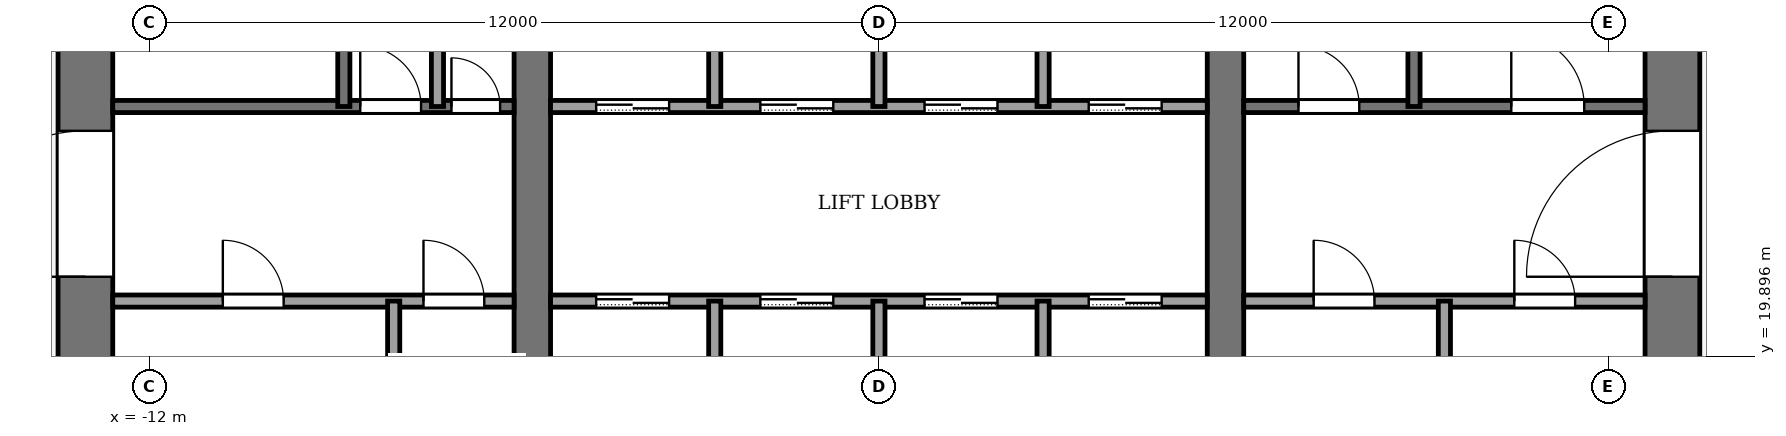
"""IFC4 building model, lengths in metres.
Left out: names, types, materials, properties, quantities, classifications, styles, units other than length and angle.
Written with IfcOpenShell. Run it as: python <this file> out.ifc"""

import sys

from ifc_helpers import new_model, si_unit, direction, frame, frame_2d, origin, place, context, subcontext, project, spatial, rectangle, extrude, element, fill, save


model = new_model("IFC4")
c1 = context("Model", 3, precision=1e-05, world=origin(), true_north=direction((0.0, 1.0)))
c2 = subcontext(c1, "Body", "Model", "MODEL_VIEW")
j1 = project(units=[si_unit("LENGTHUNIT", "METRE"), si_unit("PLANEANGLEUNIT", "RADIAN")], contexts=[c1])
p1 = place(None, origin())
s1 = spatial("IfcSite", under=j1, at=p1, CompositionType="ELEMENT")
p2 = place(p1, origin())
s2 = spatial("IfcBuilding", under=s1, at=p2, CompositionType="ELEMENT")
p3 = place(p2, frame((0.0, 0.0, 186.0)))
s3 = spatial("IfcBuildingStorey", under=s2, at=p3, CompositionType="ELEMENT", Elevation=186.0)
p4 = place(p3, frame((-13.05, 18.4, -0.13), z_axis=(0.0, 0.0, 1.0), x_axis=(0.0, 1.0, 0.0)))
e1 = element("IfcWall", 1, at=p4, inside=s3, PredefinedType="SHEAR", context=c2, shape_type="SweptSolid", body=[
    extrude(rectangle(XDim=19.2, YDim=0.9, at=frame_2d((9.6, 0.0))), origin(), (0.0, 0.0, 1.0), 4.0),
])
p5 = place(p4, frame((2.8, 0.0, 0.13)))
e2 = element("IfcOpeningElement", 2, at=p5, cuts=e1, PredefinedType="OPENING", context=c2, shape_type="SweptSolid", body=[
    extrude(rectangle(XDim=2.4, YDim=2.4, at=frame_2d((1.2, 1.2))), frame((0.0, 0.46, 0.0), z_axis=(0.0, -1.0, 0.0), x_axis=(1.0, 0.0, 0.0)), (0.0, 0.0, 1.0), 0.92),
])
p6 = place(p4, frame((13.4, 0.0, 0.13)))
e3 = element("IfcOpeningElement", 3, at=p6, cuts=e1, PredefinedType="OPENING", context=c2, shape_type="SweptSolid", body=[
    extrude(rectangle(XDim=1.4, YDim=2.2, at=frame_2d((0.7, 1.1))), frame((0.0, 0.46, 0.0), z_axis=(0.0, -1.0, 0.0), x_axis=(1.0, 0.0, 0.0)), (0.0, 0.0, 1.0), 0.92),
])
p7 = place(p3, frame((13.05, 18.4, -0.13), z_axis=(0.0, 0.0, 1.0), x_axis=(0.0, 1.0, 0.0)))
e4 = element("IfcWall", 4, at=p7, inside=s3, PredefinedType="SHEAR", context=c2, shape_type="SweptSolid", body=[
    extrude(rectangle(XDim=19.2, YDim=0.9, at=frame_2d((9.6, 0.0))), origin(), (0.0, 0.0, 1.0), 4.0),
])
p8 = place(p7, frame((2.8, 0.0, 0.13)))
e5 = element("IfcOpeningElement", 5, at=p8, cuts=e4, PredefinedType="OPENING", context=c2, shape_type="SweptSolid", body=[
    extrude(rectangle(XDim=2.4, YDim=2.4, at=frame_2d((1.2, 1.2))), frame((0.0, 0.46, 0.0), z_axis=(0.0, -1.0, 0.0), x_axis=(1.0, 0.0, 0.0)), (0.0, 0.0, 1.0), 0.92),
])
p9 = place(p7, frame((13.3, 0.0, 0.13)))
e6 = element("IfcOpeningElement", 6, at=p9, cuts=e4, PredefinedType="OPENING", context=c2, shape_type="SweptSolid", body=[
    extrude(rectangle(XDim=2.4, YDim=2.4, at=frame_2d((1.2, 1.2))), frame((0.0, 0.46, 0.0), z_axis=(0.0, -1.0, 0.0), x_axis=(1.0, 0.0, 0.0)), (0.0, 0.0, 1.0), 0.92),
])
p10 = place(p3, frame((-5.7, 18.4, -0.13), z_axis=(0.0, 0.0, 1.0), x_axis=(0.0, 1.0, 0.0)))
e7 = element("IfcWall", 7, at=p10, inside=s3, PredefinedType="SHEAR", context=c2, shape_type="SweptSolid", body=[
    extrude(rectangle(XDim=19.2, YDim=0.6, at=frame_2d((9.6, 0.0))), origin(), (0.0, 0.0, 1.0), 4.0),
])
p11 = place(p10, frame((8.35, 0.0, 0.13)))
e8 = element("IfcOpeningElement", 8, at=p11, cuts=e7, PredefinedType="OPENING", context=c2, shape_type="SweptSolid", body=[
    extrude(rectangle(XDim=0.9, YDim=2.1, at=frame_2d((0.45, 1.05))), frame((0.0, 0.31, 0.0), z_axis=(0.0, -1.0, 0.0), x_axis=(1.0, 0.0, 0.0)), (0.0, 0.0, 1.0), 0.62),
])
p12 = place(p3, frame((5.7, 18.4, -0.13), z_axis=(0.0, 0.0, 1.0), x_axis=(0.0, 1.0, 0.0)))
e9 = element("IfcWall", 9, at=p12, inside=s3, PredefinedType="SHEAR", context=c2, shape_type="SweptSolid", body=[
    extrude(rectangle(XDim=19.2, YDim=0.6, at=frame_2d((9.6, 0.0))), origin(), (0.0, 0.0, 1.0), 4.0),
])
p13 = place(p12, frame((8.35, 0.0, 0.13)))
e10 = element("IfcOpeningElement", 10, at=p13, cuts=e9, PredefinedType="OPENING", context=c2, shape_type="SweptSolid", body=[
    extrude(rectangle(XDim=0.9, YDim=2.1, at=frame_2d((0.45, 1.05))), frame((0.0, 0.31, 0.0), z_axis=(0.0, -1.0, 0.0), x_axis=(1.0, 0.0, 0.0)), (0.0, 0.0, 1.0), 0.62),
])
p14 = place(p12, frame((13.3, 0.0, 0.13)))
e11 = element("IfcOpeningElement", 11, at=p14, cuts=e9, PredefinedType="OPENING", context=c2, shape_type="SweptSolid", body=[
    extrude(rectangle(XDim=2.4, YDim=2.4, at=frame_2d((1.2, 1.2))), frame((0.0, 0.31, 0.0), z_axis=(0.0, -1.0, 0.0), x_axis=(1.0, 0.0, 0.0)), (0.0, 0.0, 1.0), 0.62),
])
p15 = place(p3, frame((-12.6, 20.8, 0.0), z_axis=(0.0, 0.0, 1.0), x_axis=(1.0, 0.0, 0.0)))
e12 = element("IfcWall", 12, at=p15, inside=s3, PredefinedType="PARTITIONING", context=c2, shape_type="SweptSolid", body=[
    extrude(rectangle(XDim=6.6, YDim=0.2, at=frame_2d((3.3, 0.0))), origin(), (0.0, 0.0, 1.0), 3.87),
])
p16 = place(p15, frame((1.81, 0.0, 0.0)))
e13 = element("IfcOpeningElement", 13, at=p16, cuts=e12, PredefinedType="OPENING", context=c2, shape_type="SweptSolid", body=[
    extrude(rectangle(XDim=1.0, YDim=2.1, at=frame_2d((0.5, 1.05))), frame((0.0, 0.11, 0.0), z_axis=(0.0, -1.0, 0.0), x_axis=(1.0, 0.0, 0.0)), (0.0, 0.0, 1.0), 0.22),
])
p17 = place(p15, frame((5.11, 0.0, 0.0)))
e14 = element("IfcOpeningElement", 14, at=p17, cuts=e12, PredefinedType="OPENING", context=c2, shape_type="SweptSolid", body=[
    extrude(rectangle(XDim=1.0, YDim=2.1, at=frame_2d((0.5, 1.05))), frame((0.0, 0.11, 0.0), z_axis=(0.0, -1.0, 0.0), x_axis=(1.0, 0.0, 0.0)), (0.0, 0.0, 1.0), 0.22),
])
p18 = place(p3, frame((-5.4, 20.8, 0.0), z_axis=(0.0, 0.0, 1.0), x_axis=(1.0, 0.0, 0.0)))
e15 = element("IfcWall", 15, at=p18, inside=s3, PredefinedType="PARTITIONING", context=c2, shape_type="SweptSolid", body=[
    extrude(rectangle(XDim=10.8, YDim=0.2, at=frame_2d((5.4, 0.0))), origin(), (0.0, 0.0, 1.0), 3.87),
])
p19 = place(p18, frame((0.75, 0.0, 0.0)))
e16 = element("IfcOpeningElement", 16, at=p19, cuts=e15, PredefinedType="OPENING", context=c2, shape_type="SweptSolid", body=[
    extrude(rectangle(XDim=1.2, YDim=2.2, at=frame_2d((0.6, 1.1))), frame((0.0, 0.11, 0.0), z_axis=(0.0, -1.0, 0.0), x_axis=(1.0, 0.0, 0.0)), (0.0, 0.0, 1.0), 0.22),
])
p20 = place(p18, frame((3.45, 0.0, 0.0)))
e17 = element("IfcOpeningElement", 17, at=p20, cuts=e15, PredefinedType="OPENING", context=c2, shape_type="SweptSolid", body=[
    extrude(rectangle(XDim=1.2, YDim=2.2, at=frame_2d((0.6, 1.1))), frame((0.0, 0.11, 0.0), z_axis=(0.0, -1.0, 0.0), x_axis=(1.0, 0.0, 0.0)), (0.0, 0.0, 1.0), 0.22),
])
p21 = place(p18, frame((6.15, 0.0, 0.0)))
e18 = element("IfcOpeningElement", 18, at=p21, cuts=e15, PredefinedType="OPENING", context=c2, shape_type="SweptSolid", body=[
    extrude(rectangle(XDim=1.2, YDim=2.2, at=frame_2d((0.6, 1.1))), frame((0.0, 0.11, 0.0), z_axis=(0.0, -1.0, 0.0), x_axis=(1.0, 0.0, 0.0)), (0.0, 0.0, 1.0), 0.22),
])
p22 = place(p18, frame((8.85, 0.0, 0.0)))
e19 = element("IfcOpeningElement", 19, at=p22, cuts=e15, PredefinedType="OPENING", context=c2, shape_type="SweptSolid", body=[
    extrude(rectangle(XDim=1.2, YDim=2.2, at=frame_2d((0.6, 1.1))), frame((0.0, 0.11, 0.0), z_axis=(0.0, -1.0, 0.0), x_axis=(1.0, 0.0, 0.0)), (0.0, 0.0, 1.0), 0.22),
])
p23 = place(p3, frame((6.0, 20.8, 0.0), z_axis=(0.0, 0.0, 1.0), x_axis=(1.0, 0.0, 0.0)))
e20 = element("IfcWall", 20, at=p23, inside=s3, PredefinedType="PARTITIONING", context=c2, shape_type="SweptSolid", body=[
    extrude(rectangle(XDim=6.6, YDim=0.2, at=frame_2d((3.3, 0.0))), origin(), (0.0, 0.0, 1.0), 3.87),
])
p24 = place(p23, frame((1.15, 0.0, 0.0)))
e21 = element("IfcOpeningElement", 21, at=p24, cuts=e20, PredefinedType="OPENING", context=c2, shape_type="SweptSolid", body=[
    extrude(rectangle(XDim=1.0, YDim=2.1, at=frame_2d((0.5, 1.05))), frame((0.0, 0.11, 0.0), z_axis=(0.0, -1.0, 0.0), x_axis=(1.0, 0.0, 0.0)), (0.0, 0.0, 1.0), 0.22),
])
p25 = place(p23, frame((4.45, 0.0, 0.0)))
e22 = element("IfcOpeningElement", 22, at=p25, cuts=e20, PredefinedType="OPENING", context=c2, shape_type="SweptSolid", body=[
    extrude(rectangle(XDim=1.0, YDim=2.1, at=frame_2d((0.5, 1.05))), frame((0.0, 0.11, 0.0), z_axis=(0.0, -1.0, 0.0), x_axis=(1.0, 0.0, 0.0)), (0.0, 0.0, 1.0), 0.22),
])
p26 = place(p3, frame((-12.6, 24.0, 0.0), z_axis=(0.0, 0.0, 1.0), x_axis=(1.0, 0.0, 0.0)))
e23 = element("IfcWall", 23, at=p26, inside=s3, PredefinedType="PARTITIONING", context=c2, shape_type="SweptSolid", body=[
    extrude(rectangle(XDim=6.6, YDim=0.2, at=frame_2d((3.3, 0.0))), origin(), (0.0, 0.0, 1.0), 3.87),
])
p27 = place(p26, frame((4.07, 0.0, 0.0)))
e24 = element("IfcOpeningElement", 24, at=p27, cuts=e23, PredefinedType="OPENING", context=c2, shape_type="SweptSolid", body=[
    extrude(rectangle(XDim=1.0, YDim=2.1, at=frame_2d((0.5, 1.05))), frame((0.0, 0.11, 0.0), z_axis=(0.0, -1.0, 0.0), x_axis=(1.0, 0.0, 0.0)), (0.0, 0.0, 1.0), 0.22),
])
p28 = place(p26, frame((5.57, 0.0, 0.0)))
e25 = element("IfcOpeningElement", 25, at=p28, cuts=e23, PredefinedType="OPENING", context=c2, shape_type="SweptSolid", body=[
    extrude(rectangle(XDim=0.8, YDim=2.1, at=frame_2d((0.4, 1.05))), frame((0.0, 0.11, 0.0), z_axis=(0.0, -1.0, 0.0), x_axis=(1.0, 0.0, 0.0)), (0.0, 0.0, 1.0), 0.22),
])
p29 = place(p3, frame((-5.4, 24.0, 0.0), z_axis=(0.0, 0.0, 1.0), x_axis=(1.0, 0.0, 0.0)))
e26 = element("IfcWall", 26, at=p29, inside=s3, PredefinedType="PARTITIONING", context=c2, shape_type="SweptSolid", body=[
    extrude(rectangle(XDim=10.8, YDim=0.2, at=frame_2d((5.4, 0.0))), origin(), (0.0, 0.0, 1.0), 3.87),
])
p30 = place(p29, frame((0.75, 0.0, 0.0)))
e27 = element("IfcOpeningElement", 27, at=p30, cuts=e26, PredefinedType="OPENING", context=c2, shape_type="SweptSolid", body=[
    extrude(rectangle(XDim=1.2, YDim=2.2, at=frame_2d((0.6, 1.1))), frame((0.0, 0.11, 0.0), z_axis=(0.0, -1.0, 0.0), x_axis=(1.0, 0.0, 0.0)), (0.0, 0.0, 1.0), 0.22),
])
p31 = place(p29, frame((3.45, 0.0, 0.0)))
e28 = element("IfcOpeningElement", 28, at=p31, cuts=e26, PredefinedType="OPENING", context=c2, shape_type="SweptSolid", body=[
    extrude(rectangle(XDim=1.2, YDim=2.2, at=frame_2d((0.6, 1.1))), frame((0.0, 0.11, 0.0), z_axis=(0.0, -1.0, 0.0), x_axis=(1.0, 0.0, 0.0)), (0.0, 0.0, 1.0), 0.22),
])
p32 = place(p29, frame((6.15, 0.0, 0.0)))
e29 = element("IfcOpeningElement", 29, at=p32, cuts=e26, PredefinedType="OPENING", context=c2, shape_type="SweptSolid", body=[
    extrude(rectangle(XDim=1.2, YDim=2.2, at=frame_2d((0.6, 1.1))), frame((0.0, 0.11, 0.0), z_axis=(0.0, -1.0, 0.0), x_axis=(1.0, 0.0, 0.0)), (0.0, 0.0, 1.0), 0.22),
])
p33 = place(p29, frame((8.85, 0.0, 0.0)))
e30 = element("IfcOpeningElement", 30, at=p33, cuts=e26, PredefinedType="OPENING", context=c2, shape_type="SweptSolid", body=[
    extrude(rectangle(XDim=1.2, YDim=2.2, at=frame_2d((0.6, 1.1))), frame((0.0, 0.11, 0.0), z_axis=(0.0, -1.0, 0.0), x_axis=(1.0, 0.0, 0.0)), (0.0, 0.0, 1.0), 0.22),
])
p34 = place(p3, frame((6.0, 24.0, 0.0), z_axis=(0.0, 0.0, 1.0), x_axis=(1.0, 0.0, 0.0)))
e31 = element("IfcWall", 31, at=p34, inside=s3, PredefinedType="PARTITIONING", context=c2, shape_type="SweptSolid", body=[
    extrude(rectangle(XDim=6.6, YDim=0.2, at=frame_2d((3.3, 0.0))), origin(), (0.0, 0.0, 1.0), 3.87),
])
p35 = place(p34, frame((0.9, 0.0, 0.0)))
e32 = element("IfcOpeningElement", 32, at=p35, cuts=e31, PredefinedType="OPENING", context=c2, shape_type="SweptSolid", body=[
    extrude(rectangle(XDim=1.0, YDim=2.1, at=frame_2d((0.5, 1.05))), frame((0.0, 0.11, 0.0), z_axis=(0.0, -1.0, 0.0), x_axis=(1.0, 0.0, 0.0)), (0.0, 0.0, 1.0), 0.22),
])
p36 = place(p34, frame((4.4, 0.0, 0.0)))
e33 = element("IfcOpeningElement", 33, at=p36, cuts=e31, PredefinedType="OPENING", context=c2, shape_type="SweptSolid", body=[
    extrude(rectangle(XDim=1.2, YDim=2.2, at=frame_2d((0.6, 1.1))), frame((0.0, 0.11, 0.0), z_axis=(0.0, -1.0, 0.0), x_axis=(1.0, 0.0, 0.0)), (0.0, 0.0, 1.0), 0.22),
])
p37 = place(p3, frame((-8.8, 24.0, 0.0), z_axis=(0.0, 0.0, 1.0), x_axis=(0.0, 1.0, 0.0)))
e34 = element("IfcWall", 34, at=p37, inside=s3, PredefinedType="PARTITIONING", context=c2, shape_type="SweptSolid", body=[
    extrude(rectangle(XDim=7.4, YDim=0.2, at=frame_2d((3.7, 0.0))), origin(), (0.0, 0.0, 1.0), 3.87),
])
p38 = place(p3, frame((-7.98, 18.4, 0.0), z_axis=(0.0, 0.0, 1.0), x_axis=(0.0, 1.0, 0.0)))
e35 = element("IfcWall", 35, at=p38, inside=s3, PredefinedType="PARTITIONING", context=c2, shape_type="SweptSolid", body=[
    extrude(rectangle(XDim=2.4, YDim=0.2, at=frame_2d((1.2, 0.0))), origin(), (0.0, 0.0, 1.0), 3.87),
])
p39 = place(p3, frame((-7.26, 24.0, 0.0), z_axis=(0.0, 0.0, 1.0), x_axis=(0.0, 1.0, 0.0)))
e36 = element("IfcWall", 36, at=p39, inside=s3, PredefinedType="PARTITIONING", context=c2, shape_type="SweptSolid", body=[
    extrude(rectangle(XDim=7.4, YDim=0.2, at=frame_2d((3.7, 0.0))), origin(), (0.0, 0.0, 1.0), 3.87),
])
p40 = place(p3, frame((-2.7, 18.4, 0.0), z_axis=(0.0, 0.0, 1.0), x_axis=(0.0, 1.0, 0.0)))
e37 = element("IfcWall", 37, at=p40, inside=s3, PredefinedType="PARTITIONING", context=c2, shape_type="SweptSolid", body=[
    extrude(rectangle(XDim=2.4, YDim=0.2, at=frame_2d((1.2, 0.0))), origin(), (0.0, 0.0, 1.0), 3.87),
])
p41 = place(p3, frame((-2.7, 24.0, 0.0), z_axis=(0.0, 0.0, 1.0), x_axis=(0.0, 1.0, 0.0)))
e38 = element("IfcWall", 38, at=p41, inside=s3, PredefinedType="PARTITIONING", context=c2, shape_type="SweptSolid", body=[
    extrude(rectangle(XDim=2.4, YDim=0.2, at=frame_2d((1.2, 0.0))), origin(), (0.0, 0.0, 1.0), 3.87),
])
p42 = place(p3, frame((0.0, 18.4, 0.0), z_axis=(0.0, 0.0, 1.0), x_axis=(0.0, 1.0, 0.0)))
e39 = element("IfcWall", 39, at=p42, inside=s3, PredefinedType="PARTITIONING", context=c2, shape_type="SweptSolid", body=[
    extrude(rectangle(XDim=2.4, YDim=0.2, at=frame_2d((1.2, 0.0))), origin(), (0.0, 0.0, 1.0), 3.87),
])
p43 = place(p3, frame((0.0, 24.0, 0.0), z_axis=(0.0, 0.0, 1.0), x_axis=(0.0, 1.0, 0.0)))
e40 = element("IfcWall", 40, at=p43, inside=s3, PredefinedType="PARTITIONING", context=c2, shape_type="SweptSolid", body=[
    extrude(rectangle(XDim=4.0, YDim=0.2, at=frame_2d((2.0, 0.0))), origin(), (0.0, 0.0, 1.0), 3.87),
])
p44 = place(p3, frame((2.7, 18.4, 0.0), z_axis=(0.0, 0.0, 1.0), x_axis=(0.0, 1.0, 0.0)))
e41 = element("IfcWall", 41, at=p44, inside=s3, PredefinedType="PARTITIONING", context=c2, shape_type="SweptSolid", body=[
    extrude(rectangle(XDim=2.4, YDim=0.2, at=frame_2d((1.2, 0.0))), origin(), (0.0, 0.0, 1.0), 3.87),
])
p45 = place(p3, frame((2.7, 24.0, 0.0), z_axis=(0.0, 0.0, 1.0), x_axis=(0.0, 1.0, 0.0)))
e42 = element("IfcWall", 42, at=p45, inside=s3, PredefinedType="PARTITIONING", context=c2, shape_type="SweptSolid", body=[
    extrude(rectangle(XDim=2.4, YDim=0.2, at=frame_2d((1.2, 0.0))), origin(), (0.0, 0.0, 1.0), 3.87),
])
p46 = place(p3, frame((8.8, 24.0, 0.0), z_axis=(0.0, 0.0, 1.0), x_axis=(0.0, 1.0, 0.0)))
e43 = element("IfcWall", 43, at=p46, inside=s3, PredefinedType="PARTITIONING", context=c2, shape_type="SweptSolid", body=[
    extrude(rectangle(XDim=7.4, YDim=0.2, at=frame_2d((3.7, 0.0))), origin(), (0.0, 0.0, 1.0), 3.87),
])
p47 = place(p3, frame((9.3, 18.4, 0.0), z_axis=(0.0, 0.0, 1.0), x_axis=(0.0, 1.0, 0.0)))
e44 = element("IfcWall", 44, at=p47, inside=s3, PredefinedType="PARTITIONING", context=c2, shape_type="SweptSolid", body=[
    extrude(rectangle(XDim=2.4, YDim=0.2, at=frame_2d((1.2, 0.0))), origin(), (0.0, 0.0, 1.0), 3.87),
])
p48 = place(p19, origin())
e45 = element("IfcDoor", 45, at=p48, inside=s3, OperationType="SLIDING_TO_LEFT", PredefinedType="DOOR", context=c2, shape_type="SweptSolid", body=[
    extrude(rectangle(XDim=1.2, YDim=2.2, at=frame_2d((0.6, 1.1))), frame((0.0, 0.025, 0.0), z_axis=(0.0, -1.0, 0.0), x_axis=(1.0, 0.0, 0.0)), (0.0, 0.0, 1.0), 0.05),
])
fill(e16, e45)
p49 = place(p20, origin())
e46 = element("IfcDoor", 46, at=p49, inside=s3, OperationType="SLIDING_TO_LEFT", PredefinedType="DOOR", context=c2, shape_type="SweptSolid", body=[
    extrude(rectangle(XDim=1.2, YDim=2.2, at=frame_2d((0.6, 1.1))), frame((0.0, 0.025, 0.0), z_axis=(0.0, -1.0, 0.0), x_axis=(1.0, 0.0, 0.0)), (0.0, 0.0, 1.0), 0.05),
])
fill(e17, e46)
p50 = place(p21, origin())
e47 = element("IfcDoor", 47, at=p50, inside=s3, OperationType="SLIDING_TO_LEFT", PredefinedType="DOOR", context=c2, shape_type="SweptSolid", body=[
    extrude(rectangle(XDim=1.2, YDim=2.2, at=frame_2d((0.6, 1.1))), frame((0.0, 0.025, 0.0), z_axis=(0.0, -1.0, 0.0), x_axis=(1.0, 0.0, 0.0)), (0.0, 0.0, 1.0), 0.05),
])
fill(e18, e47)
p51 = place(p22, origin())
e48 = element("IfcDoor", 48, at=p51, inside=s3, OperationType="SLIDING_TO_LEFT", PredefinedType="DOOR", context=c2, shape_type="SweptSolid", body=[
    extrude(rectangle(XDim=1.2, YDim=2.2, at=frame_2d((0.6, 1.1))), frame((0.0, 0.025, 0.0), z_axis=(0.0, -1.0, 0.0), x_axis=(1.0, 0.0, 0.0)), (0.0, 0.0, 1.0), 0.05),
])
fill(e19, e48)
p52 = place(p30, origin())
e49 = element("IfcDoor", 49, at=p52, inside=s3, OperationType="SLIDING_TO_LEFT", PredefinedType="DOOR", context=c2, shape_type="SweptSolid", body=[
    extrude(rectangle(XDim=1.2, YDim=2.2, at=frame_2d((0.6, 1.1))), frame((0.0, 0.025, 0.0), z_axis=(0.0, -1.0, 0.0), x_axis=(1.0, 0.0, 0.0)), (0.0, 0.0, 1.0), 0.05),
])
fill(e27, e49)
p53 = place(p31, origin())
e50 = element("IfcDoor", 50, at=p53, inside=s3, OperationType="SLIDING_TO_LEFT", PredefinedType="DOOR", context=c2, shape_type="SweptSolid", body=[
    extrude(rectangle(XDim=1.2, YDim=2.2, at=frame_2d((0.6, 1.1))), frame((0.0, 0.025, 0.0), z_axis=(0.0, -1.0, 0.0), x_axis=(1.0, 0.0, 0.0)), (0.0, 0.0, 1.0), 0.05),
])
fill(e28, e50)
p54 = place(p32, origin())
e51 = element("IfcDoor", 51, at=p54, inside=s3, OperationType="SLIDING_TO_LEFT", PredefinedType="DOOR", context=c2, shape_type="SweptSolid", body=[
    extrude(rectangle(XDim=1.2, YDim=2.2, at=frame_2d((0.6, 1.1))), frame((0.0, 0.025, 0.0), z_axis=(0.0, -1.0, 0.0), x_axis=(1.0, 0.0, 0.0)), (0.0, 0.0, 1.0), 0.05),
])
fill(e29, e51)
p55 = place(p33, origin())
e52 = element("IfcDoor", 52, at=p55, inside=s3, OperationType="SLIDING_TO_LEFT", PredefinedType="DOOR", context=c2, shape_type="SweptSolid", body=[
    extrude(rectangle(XDim=1.2, YDim=2.2, at=frame_2d((0.6, 1.1))), frame((0.0, 0.025, 0.0), z_axis=(0.0, -1.0, 0.0), x_axis=(1.0, 0.0, 0.0)), (0.0, 0.0, 1.0), 0.05),
])
fill(e30, e52)
p56 = place(p16, origin())
e53 = element("IfcDoor", 53, at=p56, inside=s3, OperationType="SINGLE_SWING_LEFT", PredefinedType="DOOR", context=c2, shape_type="SweptSolid", body=[
    extrude(rectangle(XDim=1.0, YDim=2.1, at=frame_2d((0.5, 1.05))), frame((0.0, 0.025, 0.0), z_axis=(0.0, -1.0, 0.0), x_axis=(1.0, 0.0, 0.0)), (0.0, 0.0, 1.0), 0.05),
])
fill(e13, e53)
p57 = place(p17, origin())
e54 = element("IfcDoor", 54, at=p57, inside=s3, OperationType="SINGLE_SWING_LEFT", PredefinedType="DOOR", context=c2, shape_type="SweptSolid", body=[
    extrude(rectangle(XDim=1.0, YDim=2.1, at=frame_2d((0.5, 1.05))), frame((0.0, 0.025, 0.0), z_axis=(0.0, -1.0, 0.0), x_axis=(1.0, 0.0, 0.0)), (0.0, 0.0, 1.0), 0.05),
])
fill(e14, e54)
p58 = place(p24, origin())
e55 = element("IfcDoor", 55, at=p58, inside=s3, OperationType="SINGLE_SWING_LEFT", PredefinedType="DOOR", context=c2, shape_type="SweptSolid", body=[
    extrude(rectangle(XDim=1.0, YDim=2.1, at=frame_2d((0.5, 1.05))), frame((0.0, 0.025, 0.0), z_axis=(0.0, -1.0, 0.0), x_axis=(1.0, 0.0, 0.0)), (0.0, 0.0, 1.0), 0.05),
])
fill(e21, e55)
p59 = place(p25, origin())
e56 = element("IfcDoor", 56, at=p59, inside=s3, OperationType="SINGLE_SWING_LEFT", PredefinedType="DOOR", context=c2, shape_type="SweptSolid", body=[
    extrude(rectangle(XDim=1.0, YDim=2.1, at=frame_2d((0.5, 1.05))), frame((0.0, 0.025, 0.0), z_axis=(0.0, -1.0, 0.0), x_axis=(1.0, 0.0, 0.0)), (0.0, 0.0, 1.0), 0.05),
])
fill(e22, e56)
p60 = place(p27, origin())
e57 = element("IfcDoor", 57, at=p60, inside=s3, OperationType="SINGLE_SWING_RIGHT", PredefinedType="DOOR", context=c2, shape_type="SweptSolid", body=[
    extrude(rectangle(XDim=1.0, YDim=2.1, at=frame_2d((0.5, 1.05))), frame((0.0, 0.025, 0.0), z_axis=(0.0, -1.0, 0.0), x_axis=(1.0, 0.0, 0.0)), (0.0, 0.0, 1.0), 0.05),
])
fill(e24, e57)
p61 = place(p28, origin())
e58 = element("IfcDoor", 58, at=p61, inside=s3, OperationType="SINGLE_SWING_LEFT", PredefinedType="DOOR", context=c2, shape_type="SweptSolid", body=[
    extrude(rectangle(XDim=0.8, YDim=2.1, at=frame_2d((0.4, 1.05))), frame((0.0, 0.025, 0.0), z_axis=(0.0, -1.0, 0.0), x_axis=(1.0, 0.0, 0.0)), (0.0, 0.0, 1.0), 0.05),
])
fill(e25, e58)
p62 = place(p35, origin())
e59 = element("IfcDoor", 59, at=p62, inside=s3, OperationType="SINGLE_SWING_RIGHT", PredefinedType="DOOR", context=c2, shape_type="SweptSolid", body=[
    extrude(rectangle(XDim=1.0, YDim=2.1, at=frame_2d((0.5, 1.05))), frame((0.0, 0.025, 0.0), z_axis=(0.0, -1.0, 0.0), x_axis=(1.0, 0.0, 0.0)), (0.0, 0.0, 1.0), 0.05),
])
fill(e32, e59)
p63 = place(p36, origin())
e60 = element("IfcDoor", 60, at=p63, inside=s3, OperationType="SINGLE_SWING_LEFT", PredefinedType="DOOR", context=c2, shape_type="SweptSolid", body=[
    extrude(rectangle(XDim=1.2, YDim=2.2, at=frame_2d((0.6, 1.1))), frame((0.0, 0.025, 0.0), z_axis=(0.0, -1.0, 0.0), x_axis=(1.0, 0.0, 0.0)), (0.0, 0.0, 1.0), 0.05),
])
fill(e33, e60)
p64 = place(p5, origin())
e61 = element("IfcDoor", 61, at=p64, inside=s3, OperationType="DOUBLE_DOOR_SINGLE_SWING", PredefinedType="DOOR", context=c2, shape_type="SweptSolid", body=[
    extrude(rectangle(XDim=2.4, YDim=2.4, at=frame_2d((1.2, 1.2))), frame((0.0, 0.025, 0.0), z_axis=(0.0, -1.0, 0.0), x_axis=(1.0, 0.0, 0.0)), (0.0, 0.0, 1.0), 0.05),
])
fill(e2, e61)
p65 = place(p8, origin())
e62 = element("IfcDoor", 62, at=p65, inside=s3, OperationType="DOUBLE_DOOR_SINGLE_SWING", PredefinedType="DOOR", context=c2, shape_type="SweptSolid", body=[
    extrude(rectangle(XDim=2.4, YDim=2.4, at=frame_2d((1.2, 1.2))), frame((0.0, 0.025, 0.0), z_axis=(0.0, -1.0, 0.0), x_axis=(1.0, 0.0, 0.0)), (0.0, 0.0, 1.0), 0.05),
])
fill(e5, e62)
save(model, sys.argv[1])
